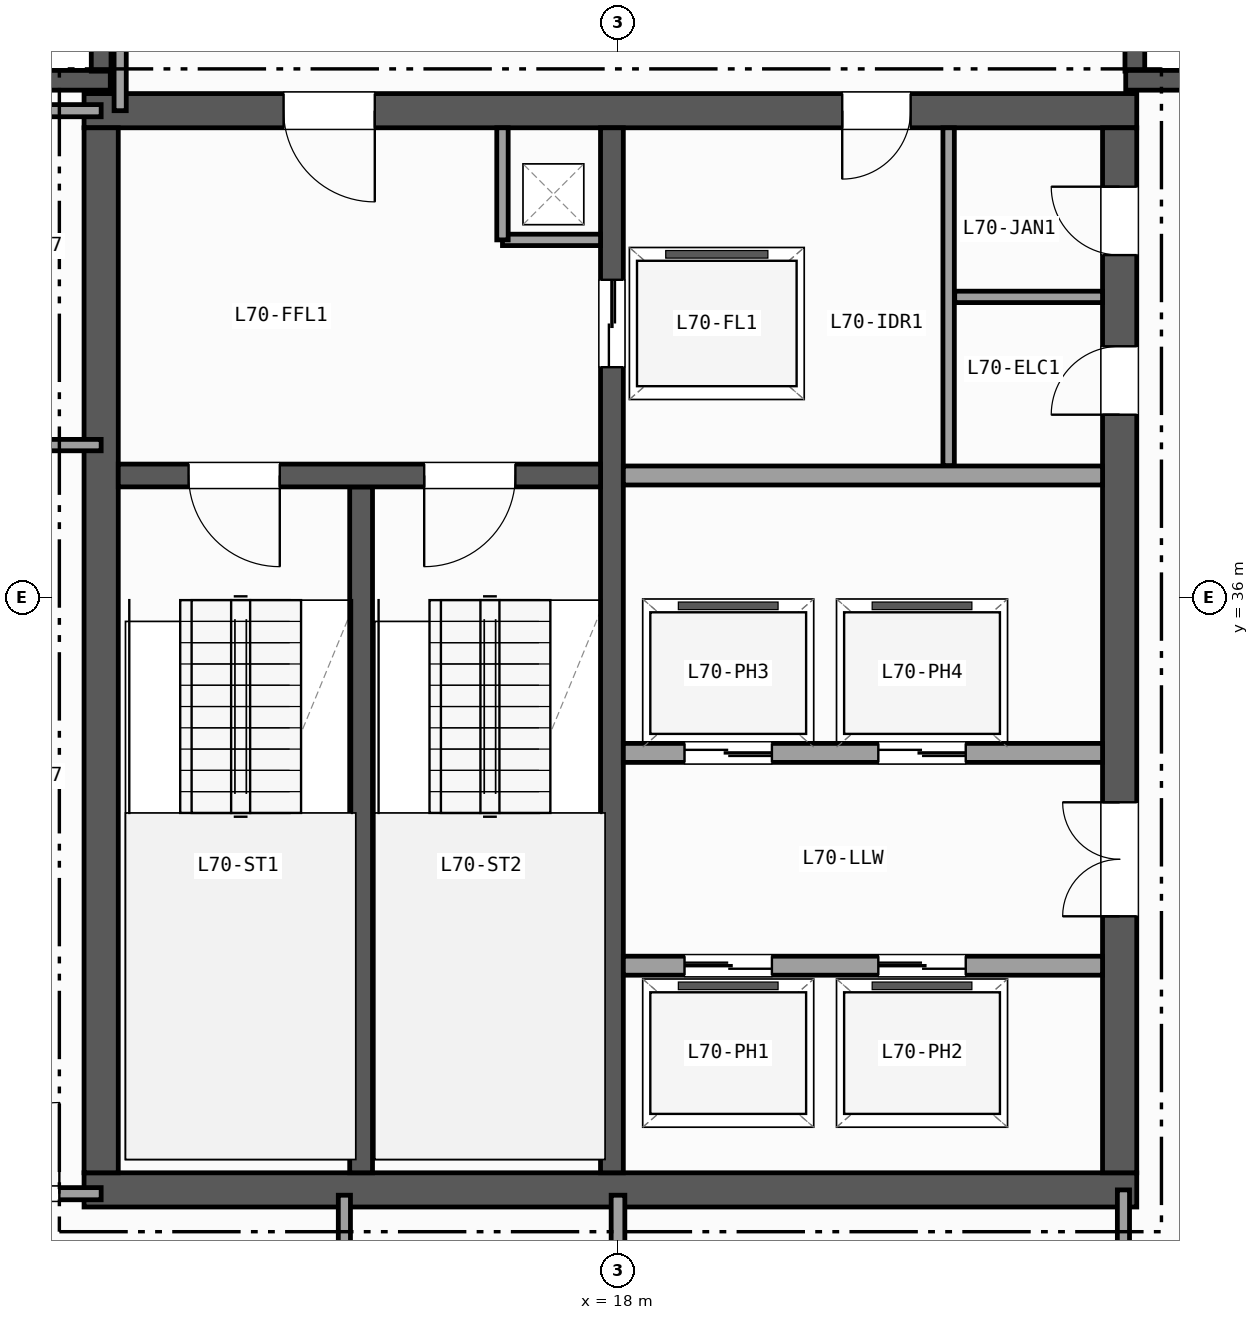
"""IFC4 building model, lengths in metres.
Left out: names, types, materials, properties, quantities, classifications, styles, units other than length and angle.
Written with IfcOpenShell. Run it as: python <this file> out.ifc"""

import sys

from ifc_helpers import new_model, si_unit, direction, frame, frame_2d, origin, place, context, subcontext, project, spatial, rectangle, extrude, element, fill, save


model = new_model("IFC4")
c1 = context("Model", 3, precision=1e-05, world=origin(), true_north=direction((0.0, 1.0)))
c2 = subcontext(c1, "Body", "Model", "MODEL_VIEW")
j1 = project(units=[si_unit("LENGTHUNIT", "METRE"), si_unit("PLANEANGLEUNIT", "RADIAN")], contexts=[c1])
p1 = place(None, origin())
s1 = spatial("IfcSite", under=j1, at=p1, CompositionType="ELEMENT")
p2 = place(p1, origin())
s2 = spatial("IfcBuilding", under=s1, at=p2, CompositionType="ELEMENT")
p3 = place(p2, frame((0.0, 0.0, 277.8)))
s3 = spatial("IfcBuildingStorey", under=s2, at=p3, CompositionType="ELEMENT", Elevation=277.8)
p4 = place(p3, frame((9.0, 42.8, 0.0), z_axis=(0.0, 0.0, 1.0), x_axis=(1.0, 0.0, 0.0)))
e1 = element("IfcWall", 1, at=p4, inside=s3, PredefinedType="SOLIDWALL", context=c2, shape_type="SweptSolid", body=[
    extrude(rectangle(XDim=2.32, YDim=0.26, at=frame_2d((1.16, 0.0))), origin(), (0.0, 0.0, 1.0), 3.42),
])
for number, where, z_axis, x_axis in (
    (2, (11.2, 42.92, 0.0), (0.0, 0.0, 1.0), (0.0, 1.0, 0.0)),
    (3, (24.8, 45.0, 0.0), (0.0, 0.0, 1.0), (0.0, -1.0, 0.0)),
):
    element("IfcWall", number, at=place(p3, frame(where, z_axis=z_axis, x_axis=x_axis)), inside=s3, PredefinedType="SOLIDWALL", context=c2, shape_type="SweptSolid", body=[
        extrude(rectangle(XDim=2.08, YDim=0.26, at=frame_2d((1.04, 0.0))), origin(), (0.0, 0.0, 1.0), 3.42),
    ])
p5 = place(p3, frame((24.68, 42.8, 0.0), z_axis=(0.0, 0.0, 1.0), x_axis=(1.0, 0.0, 0.0)))
e4 = element("IfcWall", 4, at=p5, inside=s3, PredefinedType="SOLIDWALL", context=c2, shape_type="SweptSolid", body=[
    extrude(rectangle(XDim=2.32, YDim=0.26, at=frame_2d((1.16, 0.0))), origin(), (0.0, 0.0, 1.0), 3.42),
])
p6 = place(p3, frame((10.975, 28.2, 0.0), z_axis=(0.0, 0.0, 1.0), x_axis=(1.0, 0.0, 0.0)))
e5 = element("IfcWall", 5, at=p6, inside=s3, PredefinedType="SHEAR", context=c2, shape_type="SweptSolid", body=[
    extrude(rectangle(XDim=13.85, YDim=0.45, at=frame_2d((6.925, 0.0))), origin(), (0.0, 0.0, 1.0), 3.42),
])
p7 = place(p3, frame((24.825, 42.4, 0.0), z_axis=(0.0, 0.0, 1.0), x_axis=(-1.0, 0.0, 0.0)))
e6 = element("IfcWall", 6, at=p7, inside=s3, PredefinedType="SHEAR", context=c2, shape_type="SweptSolid", body=[
    extrude(rectangle(XDim=13.85, YDim=0.45, at=frame_2d((6.925, 0.0))), origin(), (0.0, 0.0, 1.0), 3.42),
])
p8 = place(p7, frame((10.025, 0.0, 0.0)))
e7 = element("IfcOpeningElement", 7, at=p8, cuts=e6, PredefinedType="OPENING", context=c2, shape_type="SweptSolid", body=[
    extrude(rectangle(XDim=1.2, YDim=2.15, at=frame_2d((0.6, 1.075))), frame((0.0, 0.235, 0.0), z_axis=(0.0, -1.0, 0.0), x_axis=(1.0, 0.0, 0.0)), (0.0, 0.0, 1.0), 0.47),
])
p9 = place(p7, frame((2.975, 0.0, 0.0)))
e8 = element("IfcOpeningElement", 8, at=p9, cuts=e6, PredefinedType="OPENING", context=c2, shape_type="SweptSolid", body=[
    extrude(rectangle(XDim=0.9, YDim=2.1, at=frame_2d((0.45, 1.05))), frame((0.0, 0.235, 0.0), z_axis=(0.0, -1.0, 0.0), x_axis=(1.0, 0.0, 0.0)), (0.0, 0.0, 1.0), 0.47),
])
p10 = place(p3, frame((11.2, 42.175, 0.0), z_axis=(0.0, 0.0, 1.0), x_axis=(0.0, -1.0, 0.0)))
e9 = element("IfcWall", 9, at=p10, inside=s3, PredefinedType="SHEAR", context=c2, shape_type="SweptSolid", body=[
    extrude(rectangle(XDim=13.75, YDim=0.45, at=frame_2d((6.875, 0.0))), origin(), (0.0, 0.0, 1.0), 3.42),
])
p11 = place(p3, frame((24.6, 28.425, 0.0), z_axis=(0.0, 0.0, 1.0), x_axis=(0.0, 1.0, 0.0)))
e10 = element("IfcWall", 10, at=p11, inside=s3, PredefinedType="SHEAR", context=c2, shape_type="SweptSolid", body=[
    extrude(rectangle(XDim=13.75, YDim=0.45, at=frame_2d((6.875, 0.0))), origin(), (0.0, 0.0, 1.0), 3.42),
])
p12 = place(p11, frame((3.375, 0.0, 0.0)))
e11 = element("IfcOpeningElement", 11, at=p12, cuts=e10, PredefinedType="OPENING", context=c2, shape_type="SweptSolid", body=[
    extrude(rectangle(XDim=1.5, YDim=2.2, at=frame_2d((0.75, 1.1))), frame((0.0, 0.235, 0.0), z_axis=(0.0, -1.0, 0.0), x_axis=(1.0, 0.0, 0.0)), (0.0, 0.0, 1.0), 0.47),
])
p13 = place(p11, frame((9.975, 0.0, 0.0)))
e12 = element("IfcOpeningElement", 12, at=p13, cuts=e10, PredefinedType="OPENING", context=c2, shape_type="SweptSolid", body=[
    extrude(rectangle(XDim=0.9, YDim=2.1, at=frame_2d((0.45, 1.05))), frame((0.0, 0.235, 0.0), z_axis=(0.0, -1.0, 0.0), x_axis=(1.0, 0.0, 0.0)), (0.0, 0.0, 1.0), 0.47),
])
p14 = place(p11, frame((12.075, 0.0, 0.0)))
e13 = element("IfcOpeningElement", 13, at=p14, cuts=e10, PredefinedType="OPENING", context=c2, shape_type="SweptSolid", body=[
    extrude(rectangle(XDim=0.9, YDim=2.1, at=frame_2d((0.45, 1.05))), frame((0.0, 0.235, 0.0), z_axis=(0.0, -1.0, 0.0), x_axis=(1.0, 0.0, 0.0)), (0.0, 0.0, 1.0), 0.47),
])
p15 = place(p3, frame((14.62, 28.425, 0.0), z_axis=(0.0, 0.0, 1.0), x_axis=(0.0, 1.0, 0.0)))
e14 = element("IfcWall", 14, at=p15, inside=s3, PredefinedType="SHEAR", context=c2, shape_type="SweptSolid", body=[
    extrude(rectangle(XDim=9.025, YDim=0.3, at=frame_2d((4.512, 0.0))), origin(), (0.0, 0.0, 1.0), 3.42),
])
p16 = place(p3, frame((17.92, 42.175, 0.0), z_axis=(0.0, 0.0, 1.0), x_axis=(0.0, -1.0, 0.0)))
e15 = element("IfcWall", 15, at=p16, inside=s3, PredefinedType="SHEAR", context=c2, shape_type="SweptSolid", body=[
    extrude(rectangle(XDim=13.75, YDim=0.3, at=frame_2d((6.875, 0.0))), origin(), (0.0, 0.0, 1.0), 3.42),
])
p17 = place(p16, frame((2.0, 0.0, 0.0)))
e16 = element("IfcOpeningElement", 16, at=p17, cuts=e15, PredefinedType="OPENING", context=c2, shape_type="SweptSolid", body=[
    extrude(rectangle(XDim=1.15, YDim=2.15, at=frame_2d((0.575, 1.075))), frame((0.0, 0.16, 0.0), z_axis=(0.0, -1.0, 0.0), x_axis=(1.0, 0.0, 0.0)), (0.0, 0.0, 1.0), 0.32),
])
p18 = place(p3, frame((17.77, 37.6, 0.0), z_axis=(0.0, 0.0, 1.0), x_axis=(-1.0, 0.0, 0.0)))
e17 = element("IfcWall", 17, at=p18, inside=s3, PredefinedType="SHEAR", context=c2, shape_type="SweptSolid", body=[
    extrude(rectangle(XDim=6.345, YDim=0.3, at=frame_2d((3.172, 0.0))), origin(), (0.0, 0.0, 1.0), 3.42),
])
p19 = place(p18, frame((4.22, 0.0, 0.0)))
e18 = element("IfcOpeningElement", 18, at=p19, cuts=e17, PredefinedType="OPENING", context=c2, shape_type="SweptSolid", body=[
    extrude(rectangle(XDim=1.2, YDim=2.15, at=frame_2d((0.6, 1.075))), frame((0.0, 0.16, 0.0), z_axis=(0.0, -1.0, 0.0), x_axis=(1.0, 0.0, 0.0)), (0.0, 0.0, 1.0), 0.32),
])
p20 = place(p18, frame((1.12, 0.0, 0.0)))
e19 = element("IfcOpeningElement", 19, at=p20, cuts=e17, PredefinedType="OPENING", context=c2, shape_type="SweptSolid", body=[
    extrude(rectangle(XDim=1.2, YDim=2.15, at=frame_2d((0.6, 1.075))), frame((0.0, 0.16, 0.0), z_axis=(0.0, -1.0, 0.0), x_axis=(1.0, 0.0, 0.0)), (0.0, 0.0, 1.0), 0.32),
])
p21 = place(p3, frame((16.48, 40.7, 0.0), z_axis=(0.0, 0.0, 1.0), x_axis=(1.0, 0.0, 0.0)))
e20 = element("IfcWall", 20, at=p21, inside=s3, PredefinedType="PARTITIONING", context=c2, shape_type="SweptSolid", body=[
    extrude(rectangle(XDim=1.29, YDim=0.15, at=frame_2d((0.645, 0.0))), origin(), (0.0, 0.0, 1.0), 3.42),
])
p22 = place(p3, frame((16.48, 40.7, 0.0), z_axis=(0.0, 0.0, 1.0), x_axis=(0.0, 1.0, 0.0)))
e21 = element("IfcWall", 21, at=p22, inside=s3, PredefinedType="PARTITIONING", context=c2, shape_type="SweptSolid", body=[
    extrude(rectangle(XDim=1.475, YDim=0.15, at=frame_2d((0.738, 0.0))), origin(), (0.0, 0.0, 1.0), 3.42),
])
p23 = place(p3, frame((18.07, 37.6, 0.0), z_axis=(0.0, 0.0, 1.0), x_axis=(1.0, 0.0, 0.0)))
e22 = element("IfcWall", 22, at=p23, inside=s3, PredefinedType="PARTITIONING", context=c2, shape_type="SweptSolid", body=[
    extrude(rectangle(XDim=6.305, YDim=0.25, at=frame_2d((3.152, 0.0))), origin(), (0.0, 0.0, 1.0), 3.42),
])
p24 = place(p3, frame((18.07, 31.15, 0.0), z_axis=(0.0, 0.0, 1.0), x_axis=(1.0, 0.0, 0.0)))
e23 = element("IfcWall", 23, at=p24, inside=s3, PredefinedType="PARTITIONING", context=c2, shape_type="SweptSolid", body=[
    extrude(rectangle(XDim=6.305, YDim=0.25, at=frame_2d((3.152, 0.0))), origin(), (0.0, 0.0, 1.0), 3.42),
])
p25 = place(p24, frame((0.805, 0.0, 0.0)))
e24 = element("IfcOpeningElement", 24, at=p25, cuts=e23, PredefinedType="OPENING", context=c2, shape_type="SweptSolid", body=[
    extrude(rectangle(XDim=1.15, YDim=2.15, at=frame_2d((0.575, 1.075))), frame((0.0, 0.135, 0.0), z_axis=(0.0, -1.0, 0.0), x_axis=(1.0, 0.0, 0.0)), (0.0, 0.0, 1.0), 0.27),
])
p26 = place(p24, frame((3.355, 0.0, 0.0)))
e25 = element("IfcOpeningElement", 25, at=p26, cuts=e23, PredefinedType="OPENING", context=c2, shape_type="SweptSolid", body=[
    extrude(rectangle(XDim=1.15, YDim=2.15, at=frame_2d((0.575, 1.075))), frame((0.0, 0.135, 0.0), z_axis=(0.0, -1.0, 0.0), x_axis=(1.0, 0.0, 0.0)), (0.0, 0.0, 1.0), 0.27),
])
p27 = place(p3, frame((24.375, 33.95, 0.0), z_axis=(0.0, 0.0, 1.0), x_axis=(-1.0, 0.0, 0.0)))
e26 = element("IfcWall", 26, at=p27, inside=s3, PredefinedType="PARTITIONING", context=c2, shape_type="SweptSolid", body=[
    extrude(rectangle(XDim=6.305, YDim=0.25, at=frame_2d((3.152, 0.0))), origin(), (0.0, 0.0, 1.0), 3.42),
])
p28 = place(p27, frame((4.35, 0.0, 0.0)))
e27 = element("IfcOpeningElement", 27, at=p28, cuts=e26, PredefinedType="OPENING", context=c2, shape_type="SweptSolid", body=[
    extrude(rectangle(XDim=1.15, YDim=2.15, at=frame_2d((0.575, 1.075))), frame((0.0, 0.135, 0.0), z_axis=(0.0, -1.0, 0.0), x_axis=(1.0, 0.0, 0.0)), (0.0, 0.0, 1.0), 0.27),
])
p29 = place(p27, frame((1.8, 0.0, 0.0)))
e28 = element("IfcOpeningElement", 28, at=p29, cuts=e26, PredefinedType="OPENING", context=c2, shape_type="SweptSolid", body=[
    extrude(rectangle(XDim=1.15, YDim=2.15, at=frame_2d((0.575, 1.075))), frame((0.0, 0.135, 0.0), z_axis=(0.0, -1.0, 0.0), x_axis=(1.0, 0.0, 0.0)), (0.0, 0.0, 1.0), 0.27),
])
p30 = place(p3, frame((22.35, 37.73, 0.0), z_axis=(0.0, 0.0, 1.0), x_axis=(0.0, 1.0, 0.0)))
e29 = element("IfcWall", 29, at=p30, inside=s3, PredefinedType="PARTITIONING", context=c2, shape_type="SweptSolid", body=[
    extrude(rectangle(XDim=4.445, YDim=0.15, at=frame_2d((2.223, 0.0))), origin(), (0.0, 0.0, 1.0), 3.42),
])
p31 = place(p3, frame((22.43, 39.95, 0.0), z_axis=(0.0, 0.0, 1.0), x_axis=(1.0, 0.0, 0.0)))
e30 = element("IfcWall", 30, at=p31, inside=s3, PredefinedType="PARTITIONING", context=c2, shape_type="SweptSolid", body=[
    extrude(rectangle(XDim=1.945, YDim=0.15, at=frame_2d((0.973, 0.0))), origin(), (0.0, 0.0, 1.0), 3.42),
])
p32 = place(p3, frame((9.0, 28.15, 0.0), z_axis=(0.0, 0.0, 1.0), x_axis=(1.0, 0.0, 0.0)))
e31 = element("IfcWall", 31, at=p32, inside=s3, PredefinedType="PARTITIONING", context=c2, shape_type="SweptSolid", body=[
    extrude(rectangle(XDim=2.2, YDim=0.16, at=frame_2d((1.1, 0.0))), origin(), (0.0, 0.0, 1.0), 2.707),
])
p33 = place(p32, frame((0.45, 0.0, 0.0)))
e32 = element("IfcOpeningElement", 32, at=p33, cuts=e31, PredefinedType="OPENING", context=c2, shape_type="SweptSolid", body=[
    extrude(rectangle(XDim=1.2, YDim=2.15, at=frame_2d((0.6, 1.075))), frame((0.0, 0.09, 0.0), z_axis=(0.0, -1.0, 0.0), x_axis=(1.0, 0.0, 0.0)), (0.0, 0.0, 1.0), 0.18),
])
p34 = place(p3, frame((8.761, 42.4, 0.0), z_axis=(0.0, 0.0, 1.0), x_axis=(1.0, 0.0, 0.0)))
e33 = element("IfcWall", 33, at=p34, inside=s3, PredefinedType="PARTITIONING", context=c2, shape_type="SweptSolid", body=[
    extrude(rectangle(XDim=2.439, YDim=0.16, at=frame_2d((1.219, 0.0))), origin(), (0.0, 0.0, 1.0), 3.42),
])
p35 = place(p3, frame((11.45, 42.4, 0.0), z_axis=(0.0, 0.0, 1.0), x_axis=(0.0, 1.0, 0.0)))
e34 = element("IfcWall", 34, at=p35, inside=s3, PredefinedType="PARTITIONING", context=c2, shape_type="SweptSolid", body=[
    extrude(rectangle(XDim=2.666, YDim=0.16, at=frame_2d((1.333, 0.0))), origin(), (0.0, 0.0, 1.0), 3.42),
])
p36 = place(p3, frame((9.0, 38.0, 0.0), z_axis=(0.0, 0.0, 1.0), x_axis=(1.0, 0.0, 0.0)))
e35 = element("IfcWall", 35, at=p36, inside=s3, PredefinedType="PARTITIONING", context=c2, shape_type="SweptSolid", body=[
    extrude(rectangle(XDim=2.2, YDim=0.15, at=frame_2d((1.1, 0.0))), origin(), (0.0, 0.0, 1.0), 3.42),
])
p37 = place(p36, frame((0.45, 0.0, 0.0)))
e36 = element("IfcOpeningElement", 36, at=p37, cuts=e35, PredefinedType="OPENING", context=c2, shape_type="SweptSolid", body=[
    extrude(rectangle(XDim=0.9, YDim=2.1, at=frame_2d((0.45, 1.05))), frame((0.0, 0.085, 0.0), z_axis=(0.0, -1.0, 0.0), x_axis=(1.0, 0.0, 0.0)), (0.0, 0.0, 1.0), 0.17),
])
p38 = place(p3, frame((24.65, 9.0, 0.0), z_axis=(0.0, 0.0, 1.0), x_axis=(0.0, 1.0, 0.0)))
e37 = element("IfcWall", 37, at=p38, inside=s3, PredefinedType="PARTITIONING", context=c2, shape_type="SweptSolid", body=[
    extrude(rectangle(XDim=19.2, YDim=0.16, at=frame_2d((9.6, 0.0))), origin(), (0.0, 0.0, 1.0), 2.707),
])
p39 = place(p38, frame((10.2, 0.0, 0.0)))
e38 = element("IfcOpeningElement", 38, at=p39, cuts=e37, PredefinedType="OPENING", context=c2, shape_type="SweptSolid", body=[
    extrude(rectangle(XDim=0.95, YDim=2.1, at=frame_2d((0.475, 1.05))), frame((0.0, 0.09, 0.0), z_axis=(0.0, -1.0, 0.0), x_axis=(1.0, 0.0, 0.0)), (0.0, 0.0, 1.0), 0.18),
])
p40 = place(p38, frame((2.55, 0.0, 0.0)))
e39 = element("IfcOpeningElement", 39, at=p40, cuts=e37, PredefinedType="OPENING", context=c2, shape_type="SweptSolid", body=[
    extrude(rectangle(XDim=1.0, YDim=2.1, at=frame_2d((0.5, 1.05))), frame((0.0, 0.09, 0.0), z_axis=(0.0, -1.0, 0.0), x_axis=(1.0, 0.0, 0.0)), (0.0, 0.0, 1.0), 0.18),
])
p41 = place(p3, frame((18.0, 17.4, 0.0), z_axis=(0.0, 0.0, 1.0), x_axis=(0.0, 1.0, 0.0)))
e40 = element("IfcWall", 40, at=p41, inside=s3, PredefinedType="PARTITIONING", context=c2, shape_type="SweptSolid", body=[
    extrude(rectangle(XDim=10.73, YDim=0.18, at=frame_2d((5.365, 0.0))), origin(), (0.0, 0.0, 1.0), 2.789),
])
p42 = place(p41, frame((4.1, 0.0, 0.0)))
e41 = element("IfcOpeningElement", 41, at=p42, cuts=e40, PredefinedType="OPENING", context=c2, shape_type="SweptSolid", body=[
    extrude(rectangle(XDim=1.05, YDim=2.15, at=frame_2d((0.525, 1.075))), frame((0.0, 0.1, 0.0), z_axis=(0.0, -1.0, 0.0), x_axis=(1.0, 0.0, 0.0)), (0.0, 0.0, 1.0), 0.2),
])
p43 = place(p3, frame((14.4, 18.0, 0.0), z_axis=(0.0, 0.0, 1.0), x_axis=(0.0, 1.0, 0.0)))
e42 = element("IfcWall", 42, at=p43, inside=s3, PredefinedType="PARTITIONING", context=c2, shape_type="SweptSolid", body=[
    extrude(rectangle(XDim=10.13, YDim=0.16, at=frame_2d((5.065, 0.0))), origin(), (0.0, 0.0, 1.0), 2.789),
])
p44 = place(p43, frame((2.5, 0.0, 0.0)))
e43 = element("IfcOpeningElement", 43, at=p44, cuts=e42, PredefinedType="OPENING", context=c2, shape_type="SweptSolid", body=[
    extrude(rectangle(XDim=1.2, YDim=2.15, at=frame_2d((0.6, 1.075))), frame((0.0, 0.09, 0.0), z_axis=(0.0, -1.0, 0.0), x_axis=(1.0, 0.0, 0.0)), (0.0, 0.0, 1.0), 0.18),
])
p45 = place(p19, origin())
e44 = element("IfcDoor", 44, at=p45, inside=s3, OperationType="SINGLE_SWING_LEFT", PredefinedType="DOOR", context=c2, shape_type="SweptSolid", body=[
    extrude(rectangle(XDim=1.2, YDim=2.15, at=frame_2d((0.6, 1.075))), frame((0.0, 0.025, 0.0), z_axis=(0.0, -1.0, 0.0), x_axis=(1.0, 0.0, 0.0)), (0.0, 0.0, 1.0), 0.05),
])
fill(e18, e44)
p46 = place(p20, origin())
e45 = element("IfcDoor", 45, at=p46, inside=s3, OperationType="SINGLE_SWING_RIGHT", PredefinedType="DOOR", context=c2, shape_type="SweptSolid", body=[
    extrude(rectangle(XDim=1.2, YDim=2.15, at=frame_2d((0.6, 1.075))), frame((0.0, 0.025, 0.0), z_axis=(0.0, -1.0, 0.0), x_axis=(1.0, 0.0, 0.0)), (0.0, 0.0, 1.0), 0.05),
])
fill(e19, e45)
p47 = place(p12, origin())
e46 = element("IfcDoor", 46, at=p47, inside=s3, OperationType="DOUBLE_DOOR_SINGLE_SWING", PredefinedType="DOOR", context=c2, shape_type="SweptSolid", body=[
    extrude(rectangle(XDim=1.5, YDim=2.2, at=frame_2d((0.75, 1.1))), frame((0.0, 0.025, 0.0), z_axis=(0.0, -1.0, 0.0), x_axis=(1.0, 0.0, 0.0)), (0.0, 0.0, 1.0), 0.05),
])
fill(e11, e46)
p48 = place(p8, origin())
e47 = element("IfcDoor", 47, at=p48, inside=s3, OperationType="SINGLE_SWING_LEFT", PredefinedType="DOOR", context=c2, shape_type="SweptSolid", body=[
    extrude(rectangle(XDim=1.2, YDim=2.15, at=frame_2d((0.6, 1.075))), frame((0.0, 0.025, 0.0), z_axis=(0.0, -1.0, 0.0), x_axis=(1.0, 0.0, 0.0)), (0.0, 0.0, 1.0), 0.05),
])
fill(e7, e47)
p49 = place(p13, origin())
e48 = element("IfcDoor", 48, at=p49, inside=s3, OperationType="SINGLE_SWING_LEFT", PredefinedType="DOOR", context=c2, shape_type="SweptSolid", body=[
    extrude(rectangle(XDim=0.9, YDim=2.1, at=frame_2d((0.45, 1.05))), frame((0.0, 0.025, 0.0), z_axis=(0.0, -1.0, 0.0), x_axis=(1.0, 0.0, 0.0)), (0.0, 0.0, 1.0), 0.05),
])
fill(e12, e48)
p50 = place(p9, origin())
e49 = element("IfcDoor", 49, at=p50, inside=s3, OperationType="SINGLE_SWING_RIGHT", PredefinedType="DOOR", context=c2, shape_type="SweptSolid", body=[
    extrude(rectangle(XDim=0.9, YDim=2.1, at=frame_2d((0.45, 1.05))), frame((0.0, 0.025, 0.0), z_axis=(0.0, -1.0, 0.0), x_axis=(1.0, 0.0, 0.0)), (0.0, 0.0, 1.0), 0.05),
])
fill(e8, e49)
p51 = place(p14, origin())
e50 = element("IfcDoor", 50, at=p51, inside=s3, OperationType="SINGLE_SWING_RIGHT", PredefinedType="DOOR", context=c2, shape_type="SweptSolid", body=[
    extrude(rectangle(XDim=0.9, YDim=2.1, at=frame_2d((0.45, 1.05))), frame((0.0, 0.025, 0.0), z_axis=(0.0, -1.0, 0.0), x_axis=(1.0, 0.0, 0.0)), (0.0, 0.0, 1.0), 0.05),
])
fill(e13, e50)
p52 = place(p17, origin())
e51 = element("IfcDoor", 51, at=p52, inside=s3, OperationType="DOUBLE_DOOR_SLIDING", PredefinedType="DOOR", context=c2, shape_type="SweptSolid", body=[
    extrude(rectangle(XDim=1.15, YDim=2.15, at=frame_2d((0.575, 1.075))), frame((0.0, 0.025, 0.0), z_axis=(0.0, -1.0, 0.0), x_axis=(1.0, 0.0, 0.0)), (0.0, 0.0, 1.0), 0.05),
])
fill(e16, e51)
p53 = place(p25, origin())
e52 = element("IfcDoor", 52, at=p53, inside=s3, OperationType="DOUBLE_DOOR_SLIDING", PredefinedType="DOOR", context=c2, shape_type="SweptSolid", body=[
    extrude(rectangle(XDim=1.15, YDim=2.15, at=frame_2d((0.575, 1.075))), frame((0.0, 0.025, 0.0), z_axis=(0.0, -1.0, 0.0), x_axis=(1.0, 0.0, 0.0)), (0.0, 0.0, 1.0), 0.05),
])
fill(e24, e52)
p54 = place(p26, origin())
e53 = element("IfcDoor", 53, at=p54, inside=s3, OperationType="DOUBLE_DOOR_SLIDING", PredefinedType="DOOR", context=c2, shape_type="SweptSolid", body=[
    extrude(rectangle(XDim=1.15, YDim=2.15, at=frame_2d((0.575, 1.075))), frame((0.0, 0.025, 0.0), z_axis=(0.0, -1.0, 0.0), x_axis=(1.0, 0.0, 0.0)), (0.0, 0.0, 1.0), 0.05),
])
fill(e25, e53)
p55 = place(p28, origin())
e54 = element("IfcDoor", 54, at=p55, inside=s3, OperationType="DOUBLE_DOOR_SLIDING", PredefinedType="DOOR", context=c2, shape_type="SweptSolid", body=[
    extrude(rectangle(XDim=1.15, YDim=2.15, at=frame_2d((0.575, 1.075))), frame((0.0, 0.025, 0.0), z_axis=(0.0, -1.0, 0.0), x_axis=(1.0, 0.0, 0.0)), (0.0, 0.0, 1.0), 0.05),
])
fill(e27, e54)
p56 = place(p29, origin())
e55 = element("IfcDoor", 55, at=p56, inside=s3, OperationType="DOUBLE_DOOR_SLIDING", PredefinedType="DOOR", context=c2, shape_type="SweptSolid", body=[
    extrude(rectangle(XDim=1.15, YDim=2.15, at=frame_2d((0.575, 1.075))), frame((0.0, 0.025, 0.0), z_axis=(0.0, -1.0, 0.0), x_axis=(1.0, 0.0, 0.0)), (0.0, 0.0, 1.0), 0.05),
])
fill(e28, e55)
p57 = place(p33, origin())
e56 = element("IfcDoor", 56, at=p57, inside=s3, OperationType="SINGLE_SWING_RIGHT", PredefinedType="DOOR", context=c2, shape_type="SweptSolid", body=[
    extrude(rectangle(XDim=1.2, YDim=2.15, at=frame_2d((0.6, 1.075))), frame((0.0, 0.025, 0.0), z_axis=(0.0, -1.0, 0.0), x_axis=(1.0, 0.0, 0.0)), (0.0, 0.0, 1.0), 0.05),
])
fill(e32, e56)
save(model, sys.argv[1])
